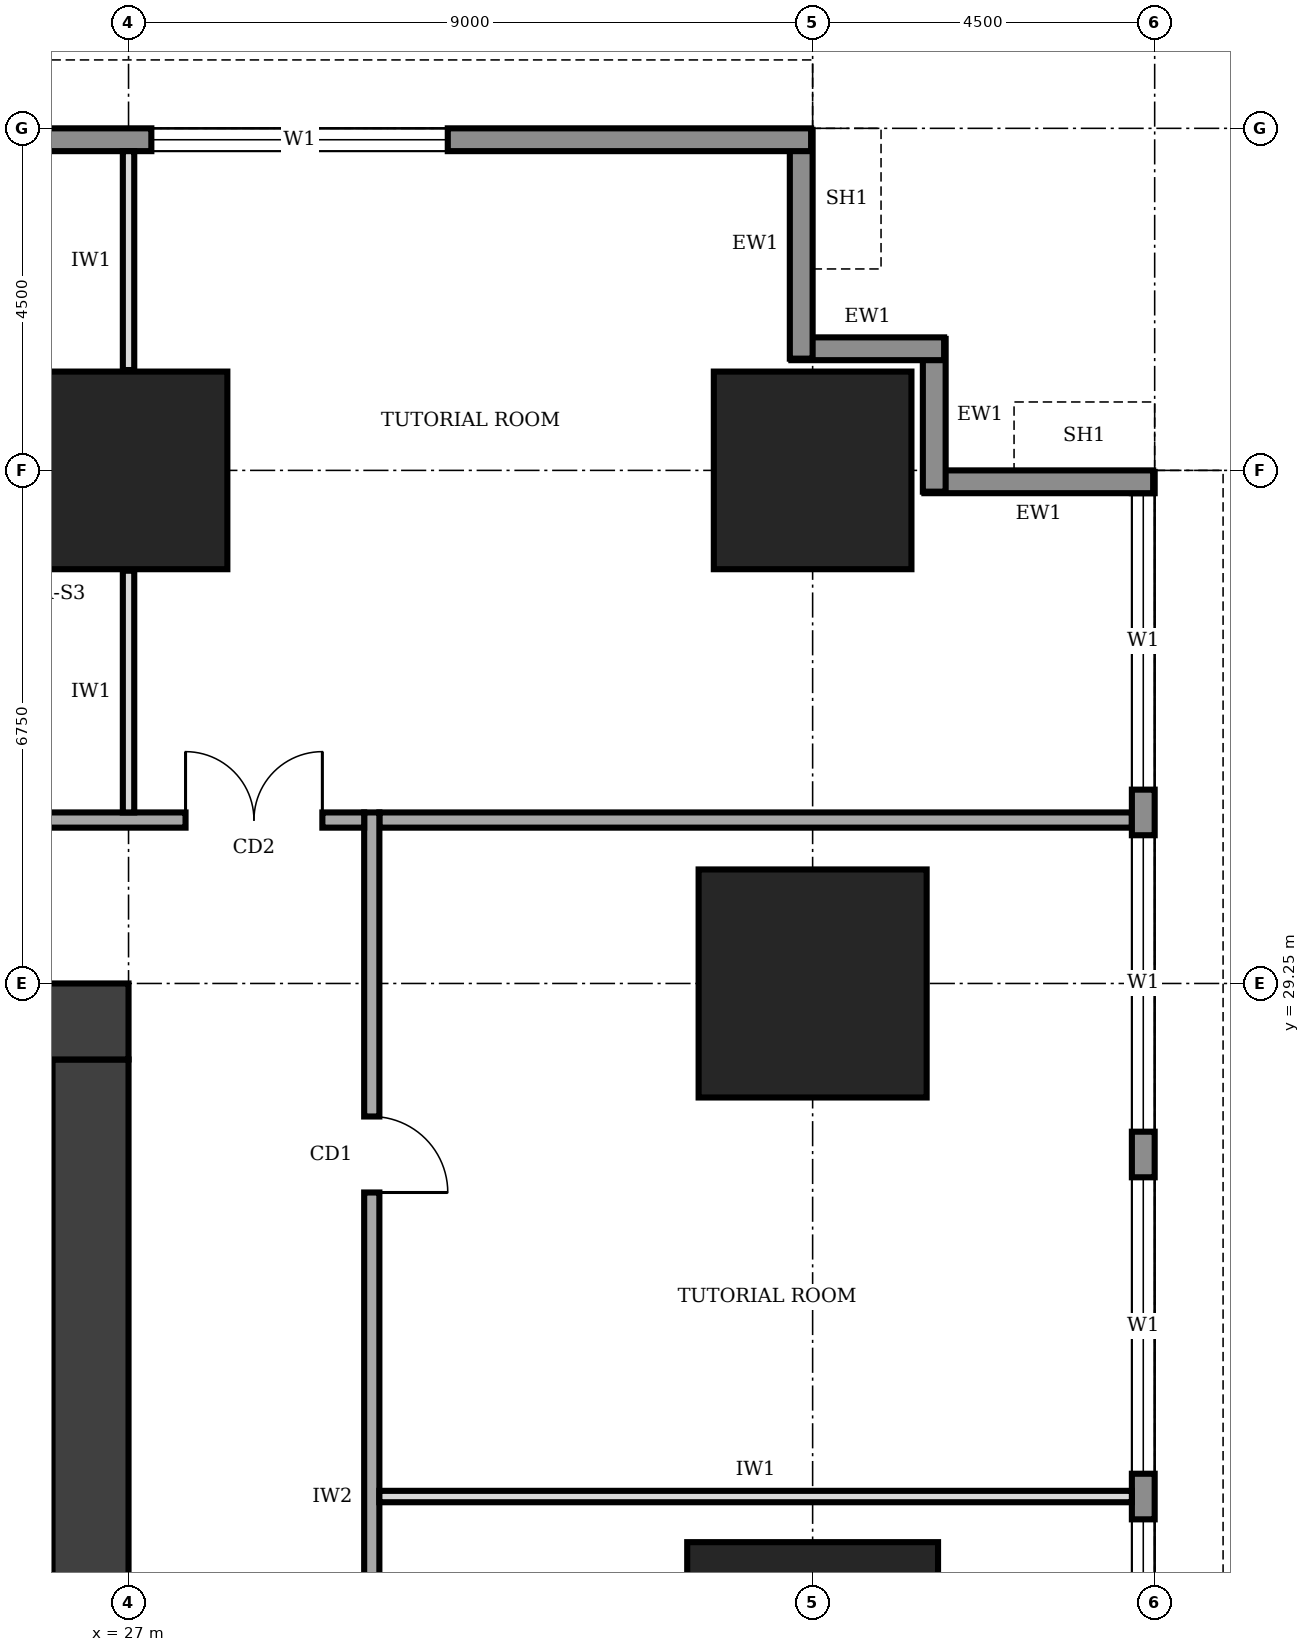
"""IFC4 building model, lengths in metres.
Left out: names, types, materials, properties, quantities, classifications, styles, units other than length and angle.
Written with IfcOpenShell. Run it as: python <this file> out.ifc"""

import sys

from ifc_helpers import new_model, si_unit, direction, frame, frame_2d, origin, origin_2d, place, context, subcontext, project, spatial, rectangle, extrude, element, fill, save


model = new_model("IFC4")
c1 = context("Model", 3, precision=1e-05, world=origin(), true_north=direction((0.0, 1.0)))
c2 = subcontext(c1, "Body", "Model", "MODEL_VIEW")
j1 = project(units=[si_unit("LENGTHUNIT", "METRE"), si_unit("PLANEANGLEUNIT", "RADIAN")], contexts=[c1])
p1 = place(None, origin())
s1 = spatial("IfcSite", under=j1, at=p1, CompositionType="ELEMENT")
p2 = place(p1, origin())
s2 = spatial("IfcBuilding", under=s1, at=p2, CompositionType="ELEMENT")
p3 = place(p2, frame((0.0, 0.0, 41.0)))
s3 = spatial("IfcBuildingStorey", under=s2, at=p3, CompositionType="ELEMENT", Elevation=41.0)
p4 = place(p3, frame((26.5, 12.25, 0.0), z_axis=(0.0, 0.0, 1.0), x_axis=(0.0, 1.0, 0.0)))
e1 = element("IfcWall", 1, at=p4, inside=s3, PredefinedType="SHEAR", context=c2, shape_type="SweptSolid", body=[
    extrude(rectangle(XDim=16.0, YDim=1.0, at=frame_2d((8.0, 0.0))), origin(), (0.0, 0.0, 1.0), 4.0),
])
p5 = place(p3, frame((27.0, 28.75, 0.0), z_axis=(0.0, 0.0, 1.0), x_axis=(-1.0, 0.0, 0.0)))
e2 = element("IfcWall", 2, at=p5, inside=s3, PredefinedType="SHEAR", context=c2, shape_type="SweptSolid", body=[
    extrude(rectangle(XDim=13.5, YDim=1.0, at=frame_2d((6.75, 0.0))), origin(), (0.0, 0.0, 1.0), 4.0),
])
p6 = place(p5, frame((4.75, 0.0, 0.0)))
e3 = element("IfcOpeningElement", 3, at=p6, cuts=e2, PredefinedType="OPENING", context=c2, shape_type="SweptSolid", body=[
    extrude(rectangle(XDim=1.8, YDim=2.1, at=frame_2d((0.9, 1.05))), frame((0.0, 0.51, 0.0), z_axis=(0.0, -1.0, 0.0), x_axis=(1.0, 0.0, 0.0)), (0.0, 0.0, 1.0), 1.02),
])
p7 = place(p3, frame((36.0, 20.25, 0.0), z_axis=(0.0, 0.0, 1.0), x_axis=(1.0, 0.0, 0.0)))
e4 = element("IfcColumn", 4, at=p7, inside=s3, PredefinedType="COLUMN", context=c2, shape_type="SweptSolid", body=[
    extrude(rectangle(XDim=3.3, YDim=3.3, at=origin_2d()), origin(), (0.0, 0.0, 1.0), 4.0),
])
p8 = place(p3, frame((36.0, 29.25, 0.0), z_axis=(0.0, 0.0, 1.0), x_axis=(1.0, 0.0, 0.0)))
e5 = element("IfcColumn", 5, at=p8, inside=s3, PredefinedType="COLUMN", context=c2, shape_type="SweptSolid", body=[
    extrude(rectangle(XDim=3.0, YDim=3.0, at=origin_2d()), origin(), (0.0, 0.0, 1.0), 4.0),
])
for number, where, z_axis, x_axis in (
    (6, (27.0, 36.0, 0.0), (0.0, 0.0, 1.0), (1.0, 0.0, 0.0)),
    (7, (36.0, 36.0, 0.0), (0.0, 0.0, 1.0), (1.0, 0.0, 0.0)),
):
    element("IfcColumn", number, at=place(p3, frame(where, z_axis=z_axis, x_axis=x_axis)), inside=s3, PredefinedType="COLUMN", context=c2, shape_type="SweptSolid", body=[
        extrude(rectangle(XDim=2.6, YDim=2.6, at=origin_2d()), origin(), (0.0, 0.0, 1.0), 4.0),
    ])
p9 = place(p3, frame((40.35, 4.52, 0.0), z_axis=(0.0, 0.0, 1.0), x_axis=(0.0, 1.0, 0.0)))
e8 = element("IfcWall", 8, at=p9, inside=s3, PredefinedType="STANDARD", context=c2, shape_type="SweptSolid", body=[
    extrude(rectangle(XDim=31.46, YDim=0.3, at=frame_2d((15.73, 0.0))), origin(), (0.0, 0.0, 1.0), 3.75),
])
p10 = place(p9, frame((4.78, 0.0, 0.9)))
e9 = element("IfcOpeningElement", 9, at=p10, cuts=e8, PredefinedType="OPENING", context=c2, shape_type="SweptSolid", body=[
    extrude(rectangle(XDim=3.9, YDim=2.2, at=frame_2d((1.95, 1.1))), frame((0.0, 0.16, 0.0), z_axis=(0.0, -1.0, 0.0), x_axis=(1.0, 0.0, 0.0)), (0.0, 0.0, 1.0), 0.32),
])
p11 = place(p9, frame((9.28, 0.0, 0.9)))
e10 = element("IfcOpeningElement", 10, at=p11, cuts=e8, PredefinedType="OPENING", context=c2, shape_type="SweptSolid", body=[
    extrude(rectangle(XDim=3.9, YDim=2.2, at=frame_2d((1.95, 1.1))), frame((0.0, 0.16, 0.0), z_axis=(0.0, -1.0, 0.0), x_axis=(1.0, 0.0, 0.0)), (0.0, 0.0, 1.0), 0.32),
])
p12 = place(p9, frame((13.78, 0.0, 0.9)))
e11 = element("IfcOpeningElement", 11, at=p12, cuts=e8, PredefinedType="OPENING", context=c2, shape_type="SweptSolid", body=[
    extrude(rectangle(XDim=3.9, YDim=2.2, at=frame_2d((1.95, 1.1))), frame((0.0, 0.16, 0.0), z_axis=(0.0, -1.0, 0.0), x_axis=(1.0, 0.0, 0.0)), (0.0, 0.0, 1.0), 0.32),
])
p13 = place(p9, frame((18.28, 0.0, 0.9)))
e12 = element("IfcOpeningElement", 12, at=p13, cuts=e8, PredefinedType="OPENING", context=c2, shape_type="SweptSolid", body=[
    extrude(rectangle(XDim=3.9, YDim=2.2, at=frame_2d((1.95, 1.1))), frame((0.0, 0.16, 0.0), z_axis=(0.0, -1.0, 0.0), x_axis=(1.0, 0.0, 0.0)), (0.0, 0.0, 1.0), 0.32),
])
p14 = place(p9, frame((22.78, 0.0, 0.9)))
e13 = element("IfcOpeningElement", 13, at=p14, cuts=e8, PredefinedType="OPENING", context=c2, shape_type="SweptSolid", body=[
    extrude(rectangle(XDim=3.9, YDim=2.2, at=frame_2d((1.95, 1.1))), frame((0.0, 0.16, 0.0), z_axis=(0.0, -1.0, 0.0), x_axis=(1.0, 0.0, 0.0)), (0.0, 0.0, 1.0), 0.32),
])
p15 = place(p9, frame((27.28, 0.0, 0.9)))
e14 = element("IfcOpeningElement", 14, at=p15, cuts=e8, PredefinedType="OPENING", context=c2, shape_type="SweptSolid", body=[
    extrude(rectangle(XDim=3.9, YDim=2.2, at=frame_2d((1.95, 1.1))), frame((0.0, 0.16, 0.0), z_axis=(0.0, -1.0, 0.0), x_axis=(1.0, 0.0, 0.0)), (0.0, 0.0, 1.0), 0.32),
])
p16 = place(p3, frame((40.48, 35.85, 0.0), z_axis=(0.0, 0.0, 1.0), x_axis=(-1.0, 0.0, 0.0)))
e15 = element("IfcWall", 15, at=p16, inside=s3, PredefinedType="STANDARD", context=c2, shape_type="SweptSolid", body=[
    extrude(rectangle(XDim=3.01, YDim=0.3, at=frame_2d((1.505, 0.0))), origin(), (0.0, 0.0, 1.0), 2.85),
])
for number, where, z_axis, x_axis in (
    (16, (37.6, 35.72, 0.0), (0.0, 0.0, 1.0), (0.0, 1.0, 0.0)),
    (17, (37.73, 37.6, 0.0), (0.0, 0.0, 1.0), (-1.0, 0.0, 0.0)),
):
    element("IfcWall", number, at=place(p3, frame(where, z_axis=z_axis, x_axis=x_axis)), inside=s3, PredefinedType="STANDARD", context=c2, shape_type="SweptSolid", body=[
        extrude(rectangle(XDim=2.01, YDim=0.3, at=frame_2d((1.005, 0.0))), origin(), (0.0, 0.0, 1.0), 3.75),
    ])
p17 = place(p3, frame((35.85, 37.47, 0.0), z_axis=(0.0, 0.0, 1.0), x_axis=(0.0, 1.0, 0.0)))
e18 = element("IfcWall", 18, at=p17, inside=s3, PredefinedType="STANDARD", context=c2, shape_type="SweptSolid", body=[
    extrude(rectangle(XDim=3.01, YDim=0.3, at=frame_2d((1.505, 0.0))), origin(), (0.0, 0.0, 1.0), 2.85),
])
p18 = place(p3, frame((35.98, 40.35, 0.0), z_axis=(0.0, 0.0, 1.0), x_axis=(-1.0, 0.0, 0.0)))
e19 = element("IfcWall", 19, at=p18, inside=s3, PredefinedType="STANDARD", context=c2, shape_type="SweptSolid", body=[
    extrude(rectangle(XDim=31.46, YDim=0.3, at=frame_2d((15.73, 0.0))), origin(), (0.0, 0.0, 1.0), 3.75),
])
p19 = place(p18, frame((27.28, 0.0, 0.9)))
e20 = element("IfcOpeningElement", 20, at=p19, cuts=e19, PredefinedType="OPENING", context=c2, shape_type="SweptSolid", body=[
    extrude(rectangle(XDim=3.9, YDim=2.2, at=frame_2d((1.95, 1.1))), frame((0.0, 0.16, 0.0), z_axis=(0.0, -1.0, 0.0), x_axis=(1.0, 0.0, 0.0)), (0.0, 0.0, 1.0), 0.32),
])
p20 = place(p18, frame((22.78, 0.0, 0.9)))
e21 = element("IfcOpeningElement", 21, at=p20, cuts=e19, PredefinedType="OPENING", context=c2, shape_type="SweptSolid", body=[
    extrude(rectangle(XDim=3.9, YDim=2.2, at=frame_2d((1.95, 1.1))), frame((0.0, 0.16, 0.0), z_axis=(0.0, -1.0, 0.0), x_axis=(1.0, 0.0, 0.0)), (0.0, 0.0, 1.0), 0.32),
])
p21 = place(p18, frame((4.78, 0.0, 0.9)))
e22 = element("IfcOpeningElement", 22, at=p21, cuts=e19, PredefinedType="OPENING", context=c2, shape_type="SweptSolid", body=[
    extrude(rectangle(XDim=3.9, YDim=2.2, at=frame_2d((1.95, 1.1))), frame((0.0, 0.16, 0.0), z_axis=(0.0, -1.0, 0.0), x_axis=(1.0, 0.0, 0.0)), (0.0, 0.0, 1.0), 0.32),
])
p22 = place(p3, frame((30.2, 9.2, 0.0), z_axis=(0.0, 0.0, 1.0), x_axis=(0.0, 1.0, 0.0)))
e23 = element("IfcWall", 23, at=p22, inside=s3, PredefinedType="SOLIDWALL", context=c2, shape_type="SweptSolid", body=[
    extrude(rectangle(XDim=22.3, YDim=0.2, at=frame_2d((11.15, 0.0))), origin(), (0.0, 0.0, 1.0), 3.75),
])
p23 = place(p22, frame((1.55, 0.0, 0.0)))
e24 = element("IfcOpeningElement", 24, at=p23, cuts=e23, PredefinedType="OPENING", context=c2, shape_type="SweptSolid", body=[
    extrude(rectangle(XDim=1.0, YDim=2.1, at=frame_2d((0.5, 1.05))), frame((0.0, 0.11, 0.0), z_axis=(0.0, -1.0, 0.0), x_axis=(1.0, 0.0, 0.0)), (0.0, 0.0, 1.0), 0.22),
])
p24 = place(p22, frame((8.3, 0.0, 0.0)))
e25 = element("IfcOpeningElement", 25, at=p24, cuts=e23, PredefinedType="OPENING", context=c2, shape_type="SweptSolid", body=[
    extrude(rectangle(XDim=1.0, YDim=2.1, at=frame_2d((0.5, 1.05))), frame((0.0, 0.11, 0.0), z_axis=(0.0, -1.0, 0.0), x_axis=(1.0, 0.0, 0.0)), (0.0, 0.0, 1.0), 0.22),
])
p25 = place(p22, frame((17.3, 0.0, 0.0)))
e26 = element("IfcOpeningElement", 26, at=p25, cuts=e23, PredefinedType="OPENING", context=c2, shape_type="SweptSolid", body=[
    extrude(rectangle(XDim=1.0, YDim=2.1, at=frame_2d((0.5, 1.05))), frame((0.0, 0.11, 0.0), z_axis=(0.0, -1.0, 0.0), x_axis=(1.0, 0.0, 0.0)), (0.0, 0.0, 1.0), 0.22),
])
p26 = place(p3, frame((30.1, 31.4, 0.0), z_axis=(0.0, 0.0, 1.0), x_axis=(-1.0, 0.0, 0.0)))
e27 = element("IfcWall", 27, at=p26, inside=s3, PredefinedType="SOLIDWALL", context=c2, shape_type="SweptSolid", body=[
    extrude(rectangle(XDim=18.4, YDim=0.2, at=frame_2d((9.2, 0.0))), origin(), (0.0, 0.0, 1.0), 3.75),
])
p27 = place(p26, frame((16.925, 0.0, 0.0)))
e28 = element("IfcOpeningElement", 28, at=p27, cuts=e27, PredefinedType="OPENING", context=c2, shape_type="SweptSolid", body=[
    extrude(rectangle(XDim=1.0, YDim=2.1, at=frame_2d((0.5, 1.05))), frame((0.0, 0.11, 0.0), z_axis=(0.0, -1.0, 0.0), x_axis=(1.0, 0.0, 0.0)), (0.0, 0.0, 1.0), 0.22),
])
p28 = place(p26, frame((13.85, 0.0, 0.0)))
e29 = element("IfcOpeningElement", 29, at=p28, cuts=e27, PredefinedType="OPENING", context=c2, shape_type="SweptSolid", body=[
    extrude(rectangle(XDim=1.0, YDim=2.1, at=frame_2d((0.5, 1.05))), frame((0.0, 0.11, 0.0), z_axis=(0.0, -1.0, 0.0), x_axis=(1.0, 0.0, 0.0)), (0.0, 0.0, 1.0), 0.22),
])
p29 = place(p26, frame((7.1, 0.0, 0.0)))
e30 = element("IfcOpeningElement", 30, at=p29, cuts=e27, PredefinedType="OPENING", context=c2, shape_type="SweptSolid", body=[
    extrude(rectangle(XDim=1.0, YDim=2.1, at=frame_2d((0.5, 1.05))), frame((0.0, 0.11, 0.0), z_axis=(0.0, -1.0, 0.0), x_axis=(1.0, 0.0, 0.0)), (0.0, 0.0, 1.0), 0.22),
])
p30 = place(p26, frame((0.55, 0.0, 0.0)))
e31 = element("IfcOpeningElement", 31, at=p30, cuts=e27, PredefinedType="OPENING", context=c2, shape_type="SweptSolid", body=[
    extrude(rectangle(XDim=1.8, YDim=2.1, at=frame_2d((0.9, 1.05))), frame((0.0, 0.11, 0.0), z_axis=(0.0, -1.0, 0.0), x_axis=(1.0, 0.0, 0.0)), (0.0, 0.0, 1.0), 0.22),
])
p31 = place(p3, frame((30.3, 31.4, 0.0), z_axis=(0.0, 0.0, 1.0), x_axis=(1.0, 0.0, 0.0)))
e32 = element("IfcWall", 32, at=p31, inside=s3, PredefinedType="SOLIDWALL", context=c2, shape_type="SweptSolid", body=[
    extrude(rectangle(XDim=9.9, YDim=0.2, at=frame_2d((4.95, 0.0))), origin(), (0.0, 0.0, 1.0), 3.75),
])
p32 = place(p3, frame((27.0, 31.5, 0.0), z_axis=(0.0, 0.0, 1.0), x_axis=(0.0, 1.0, 0.0)))
e33 = element("IfcWall", 33, at=p32, inside=s3, PredefinedType="PARTITIONING", context=c2, shape_type="SweptSolid", body=[
    extrude(rectangle(XDim=3.18, YDim=0.15, at=frame_2d((1.59, 0.0))), origin(), (0.0, 0.0, 1.0), 2.85),
])
p33 = place(p3, frame((27.0, 37.32, 0.0), z_axis=(0.0, 0.0, 1.0), x_axis=(0.0, 1.0, 0.0)))
e34 = element("IfcWall", 34, at=p33, inside=s3, PredefinedType="PARTITIONING", context=c2, shape_type="SweptSolid", body=[
    extrude(rectangle(XDim=2.88, YDim=0.15, at=frame_2d((1.44, 0.0))), origin(), (0.0, 0.0, 1.0), 2.85),
])
p34 = place(p3, frame((30.3, 22.5, 0.0), z_axis=(0.0, 0.0, 1.0), x_axis=(1.0, 0.0, 0.0)))
e35 = element("IfcWall", 35, at=p34, inside=s3, PredefinedType="PARTITIONING", context=c2, shape_type="SweptSolid", body=[
    extrude(rectangle(XDim=9.9, YDim=0.15, at=frame_2d((4.95, 0.0))), origin(), (0.0, 0.0, 1.0), 3.75),
])
p35 = place(p12, origin())
e36 = element("IfcWindow", 36, at=p35, inside=s3, PartitioningType="SINGLE_PANEL", PredefinedType="WINDOW", context=c2, shape_type="SweptSolid", body=[
    extrude(rectangle(XDim=3.9, YDim=2.2, at=frame_2d((1.95, 1.1))), frame((0.0, 0.03, 0.0), z_axis=(0.0, -1.0, 0.0), x_axis=(1.0, 0.0, 0.0)), (0.0, 0.0, 1.0), 0.06),
])
fill(e11, e36)
p36 = place(p13, origin())
e37 = element("IfcWindow", 37, at=p36, inside=s3, PartitioningType="SINGLE_PANEL", PredefinedType="WINDOW", context=c2, shape_type="SweptSolid", body=[
    extrude(rectangle(XDim=3.9, YDim=2.2, at=frame_2d((1.95, 1.1))), frame((0.0, 0.03, 0.0), z_axis=(0.0, -1.0, 0.0), x_axis=(1.0, 0.0, 0.0)), (0.0, 0.0, 1.0), 0.06),
])
fill(e12, e37)
p37 = place(p14, origin())
e38 = element("IfcWindow", 38, at=p37, inside=s3, PartitioningType="SINGLE_PANEL", PredefinedType="WINDOW", context=c2, shape_type="SweptSolid", body=[
    extrude(rectangle(XDim=3.9, YDim=2.2, at=frame_2d((1.95, 1.1))), frame((0.0, 0.03, 0.0), z_axis=(0.0, -1.0, 0.0), x_axis=(1.0, 0.0, 0.0)), (0.0, 0.0, 1.0), 0.06),
])
fill(e13, e38)
p38 = place(p15, origin())
e39 = element("IfcWindow", 39, at=p38, inside=s3, PartitioningType="SINGLE_PANEL", PredefinedType="WINDOW", context=c2, shape_type="SweptSolid", body=[
    extrude(rectangle(XDim=3.9, YDim=2.2, at=frame_2d((1.95, 1.1))), frame((0.0, 0.03, 0.0), z_axis=(0.0, -1.0, 0.0), x_axis=(1.0, 0.0, 0.0)), (0.0, 0.0, 1.0), 0.06),
])
fill(e14, e39)
p39 = place(p21, origin())
e40 = element("IfcWindow", 40, at=p39, inside=s3, PartitioningType="SINGLE_PANEL", PredefinedType="WINDOW", context=c2, shape_type="SweptSolid", body=[
    extrude(rectangle(XDim=3.9, YDim=2.2, at=frame_2d((1.95, 1.1))), frame((0.0, 0.03, 0.0), z_axis=(0.0, -1.0, 0.0), x_axis=(1.0, 0.0, 0.0)), (0.0, 0.0, 1.0), 0.06),
])
fill(e22, e40)
p40 = place(p25, frame((1.0, 0.0, 0.0), z_axis=(0.0, 0.0, 1.0), x_axis=(-1.0, 0.0, 0.0)))
e41 = element("IfcDoor", 41, at=p40, inside=s3, OperationType="SINGLE_SWING_RIGHT", PredefinedType="DOOR", context=c2, shape_type="SweptSolid", body=[
    extrude(rectangle(XDim=1.0, YDim=2.1, at=frame_2d((0.5, 1.05))), frame((0.0, 0.025, 0.0), z_axis=(0.0, -1.0, 0.0), x_axis=(1.0, 0.0, 0.0)), (0.0, 0.0, 1.0), 0.05),
])
fill(e26, e41)
p41 = place(p30, frame((1.8, 0.0, 0.0), z_axis=(0.0, 0.0, 1.0), x_axis=(-1.0, 0.0, 0.0)))
e42 = element("IfcDoor", 42, at=p41, inside=s3, OperationType="DOUBLE_DOOR_SINGLE_SWING", PredefinedType="DOOR", context=c2, shape_type="SweptSolid", body=[
    extrude(rectangle(XDim=1.8, YDim=2.1, at=frame_2d((0.9, 1.05))), frame((0.0, 0.025, 0.0), z_axis=(0.0, -1.0, 0.0), x_axis=(1.0, 0.0, 0.0)), (0.0, 0.0, 1.0), 0.05),
])
fill(e31, e42)
save(model, sys.argv[1])
